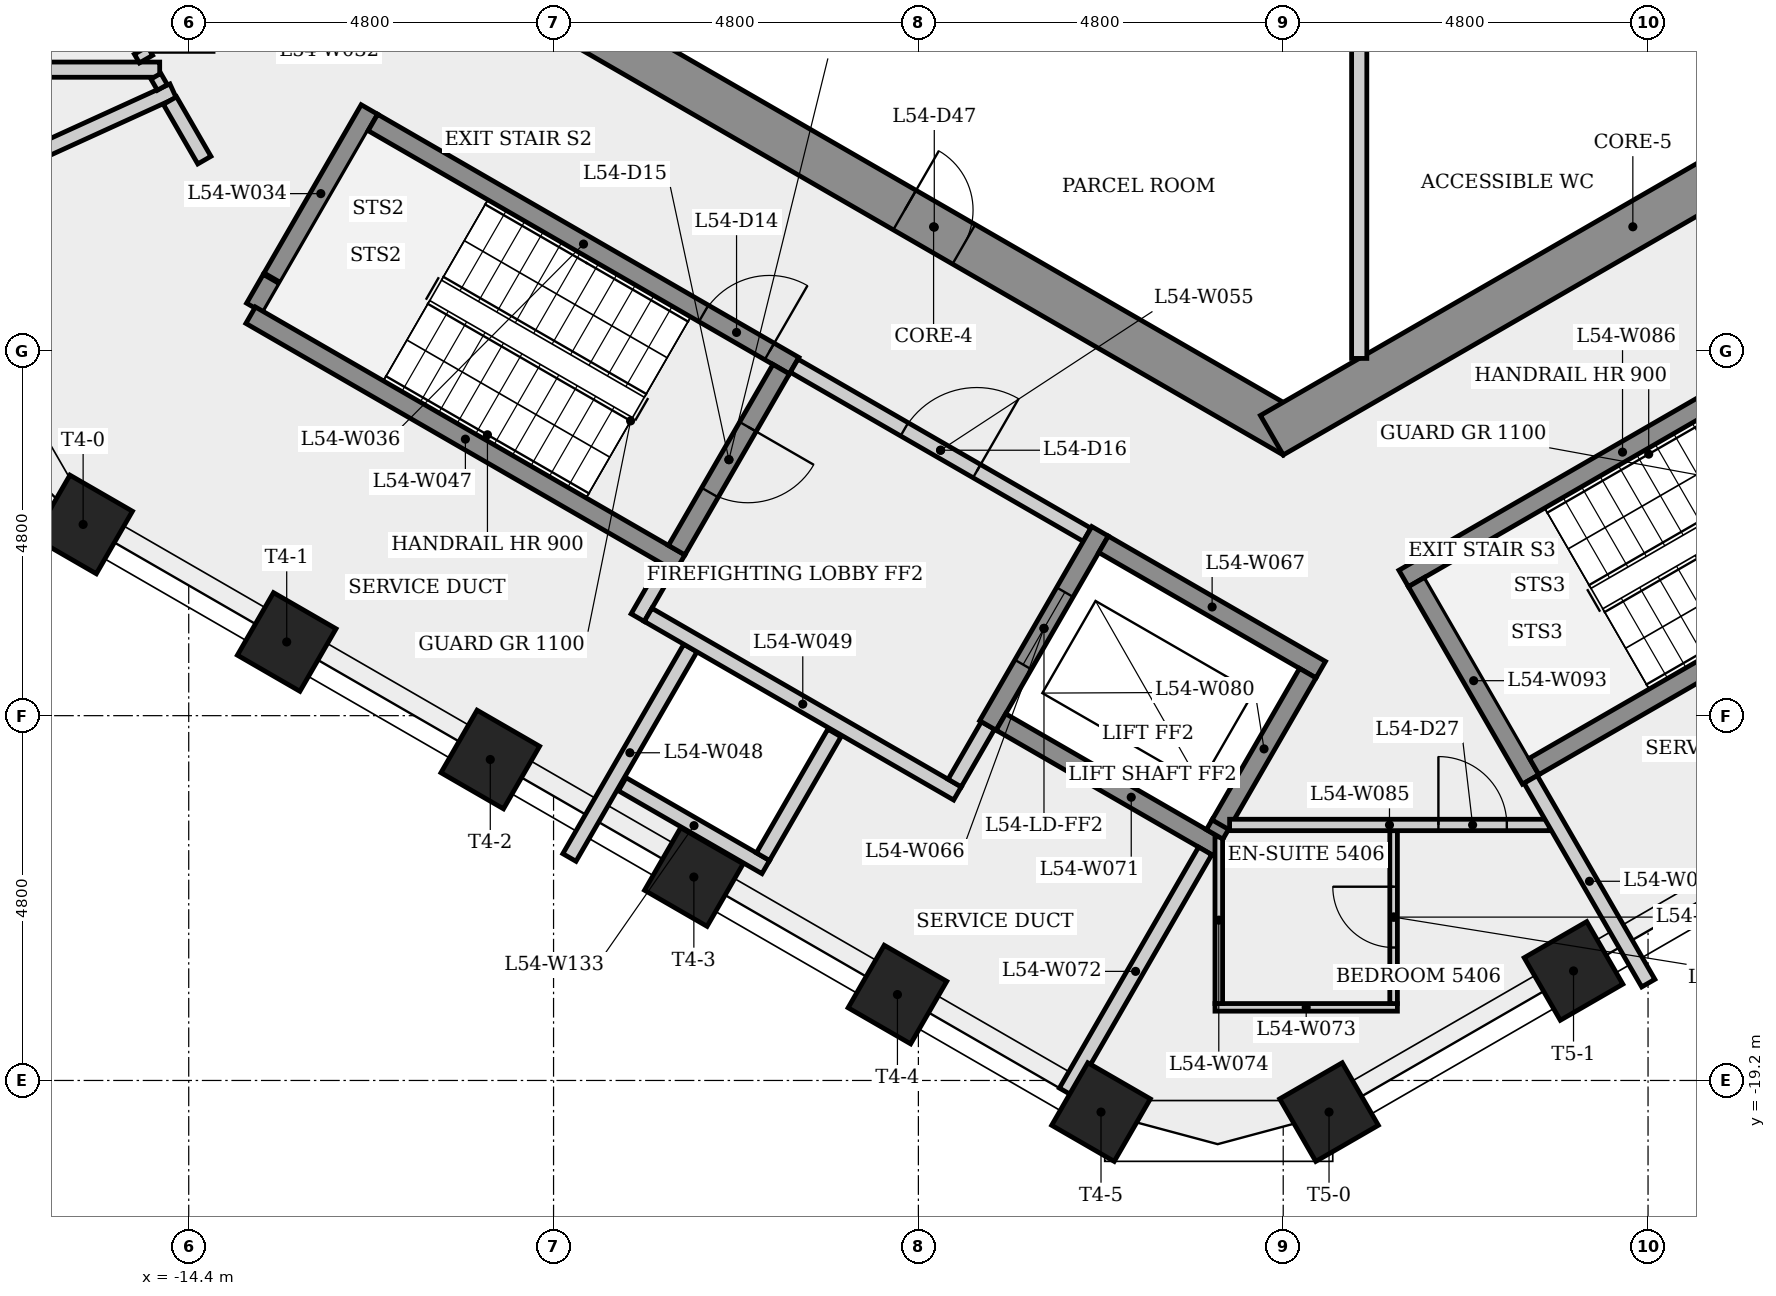
"""IFC4 building model, lengths in metres.
Left out: names, types, materials, properties, quantities, classifications, styles, units other than length and angle.
Written with IfcOpenShell. Run it as: python <this file> out.ifc"""

import sys

from ifc_helpers import new_model, si_unit, direction, frame, frame_2d, origin, origin_2d, place, context, subcontext, project, spatial, rectangle, extrude, element, fill, save


model = new_model("IFC4")
c1 = context("Model", 3, precision=1e-05, world=origin(), true_north=direction((0.0, 1.0)))
c2 = subcontext(c1, "Body", "Model", "MODEL_VIEW")
j1 = project(units=[si_unit("LENGTHUNIT", "METRE"), si_unit("PLANEANGLEUNIT", "RADIAN")], contexts=[c1])
p1 = place(None, origin())
s1 = spatial("IfcSite", under=j1, at=p1, CompositionType="ELEMENT")
p2 = place(p1, origin())
s2 = spatial("IfcBuilding", under=s1, at=p2, CompositionType="ELEMENT")
p3 = place(p2, frame((0.0, 0.0, 202.1)))
s3 = spatial("IfcBuildingStorey", under=s2, at=p3, CompositionType="ELEMENT", Elevation=202.1)
p4 = place(p3, frame((-9.35, -5.225, 0.0), z_axis=(0.0, 0.0, 1.0), x_axis=(0.866023993627, -0.500002442456, 0.0)))
e1 = element("IfcWall", 1, at=p4, inside=s3, PredefinedType="SHEAR", context=c2, shape_type="SweptSolid", body=[
    extrude(rectangle(XDim=10.97, YDim=0.6, at=frame_2d((5.485, 0.0))), origin(), (0.0, 0.0, 1.0), 4.0),
])
p5 = place(p4, frame((5.045, 0.0, 0.0)))
e2 = element("IfcOpeningElement", 2, at=p5, cuts=e1, PredefinedType="OPENING", context=c2, shape_type="SweptSolid", body=[
    extrude(rectangle(XDim=0.9, YDim=2.1, at=frame_2d((0.45, 1.05))), frame((0.0, 0.31, 0.0), z_axis=(0.0, -1.0, 0.0), x_axis=(1.0, 0.0, 0.0)), (0.0, 0.0, 1.0), 0.62),
])
p6 = place(p3, frame((-0.15, -10.71, 0.0), z_axis=(0.0, 0.0, 1.0), x_axis=(0.866023993627, 0.500002442456, 0.0)))
e3 = element("IfcWall", 3, at=p6, inside=s3, PredefinedType="SHEAR", context=c2, shape_type="SweptSolid", body=[
    extrude(rectangle(XDim=10.97, YDim=0.6, at=frame_2d((5.485, 0.0))), origin(), (0.0, 0.0, 1.0), 4.0),
])
p7 = place(p6, frame((7.281, 0.0, 0.0)))
e4 = element("IfcOpeningElement", 4, at=p7, cuts=e3, PredefinedType="OPENING", context=c2, shape_type="SweptSolid", body=[
    extrude(rectangle(XDim=0.9, YDim=2.1, at=frame_2d((0.45, 1.05))), frame((0.0, 0.31, 0.0), z_axis=(0.0, -1.0, 0.0), x_axis=(1.0, 0.0, 0.0)), (0.0, 0.0, 1.0), 0.62),
])
for number, where, z_axis, x_axis in (
    (5, (-15.789, -11.884, 0.0), (0.0, 0.0, 1.0), (-0.5, -0.866, 0.0)),
    (6, (-13.111, -13.43, 0.0), (0.0, 0.0, 1.0), (-0.5, -0.866, 0.0)),
    (7, (-10.432, -14.977, 0.0), (0.0, 0.0, 1.0), (-0.5, -0.866, 0.0)),
    (8, (-7.754, -16.523, 0.0), (0.0, 0.0, 1.0), (-0.5, -0.866, 0.0)),
    (9, (-5.076, -18.07, 0.0), (0.0, 0.0, 1.0), (-0.5, -0.866, 0.0)),
    (10, (-2.397, -19.616, 0.0), (0.0, 0.0, 1.0), (-0.5, -0.866, 0.0)),
    (11, (0.603, -19.616, 0.0), (0.0, 0.0, 1.0), (0.5, -0.866, 0.0)),
    (12, (3.82, -17.759, 0.0), (0.0, 0.0, 1.0), (0.5, -0.866, 0.0)),
):
    element("IfcColumn", number, at=place(p3, frame(where, z_axis=z_axis, x_axis=x_axis)), inside=s3, PredefinedType="COLUMN", context=c2, shape_type="SweptSolid", body=[
        extrude(rectangle(XDim=0.95, YDim=0.95, at=origin_2d()), origin(), (0.0, 0.0, 1.0), 4.0),
    ])
p8 = place(p3, frame((-29.883, -13.146, 0.0), z_axis=(0.0, 0.0, 1.0), x_axis=(0.909854392912, 0.414927684903, 0.0)))
e13 = element("IfcWall", 13, at=p8, inside=s3, PredefinedType="PLUMBINGWALL", context=c2, shape_type="SweptSolid", body=[
    extrude(rectangle(XDim=16.791, YDim=0.2, at=frame_2d((8.396, 0.0))), origin(), (0.0, 0.0, 1.0), 3.6),
])
p9 = place(p3, frame((-14.782, -5.9, 0.0), z_axis=(0.0, 0.0, 1.0), x_axis=(-1.0, 0.0, 0.0)))
e14 = element("IfcWall", 14, at=p9, inside=s3, PredefinedType="PLUMBINGWALL", context=c2, shape_type="SweptSolid", body=[
    extrude(rectangle(XDim=15.092, YDim=0.2, at=frame_2d((7.546, 0.0))), origin(), (0.0, 0.0, 1.0), 3.6),
])
p10 = place(p3, frame((-14.962, -5.761, 0.0), z_axis=(0.0, 0.0, 1.0), x_axis=(-0.499880961361, 0.866094119867, 0.0)))
e15 = element("IfcWall", 15, at=p10, inside=s3, PredefinedType="PLUMBINGWALL", context=c2, shape_type="SweptSolid", body=[
    extrude(rectangle(XDim=0.133, YDim=0.2, at=frame_2d((0.067, 0.0))), origin(), (0.0, 0.0, 1.0), 3.6),
])
p11 = place(p3, frame((-14.747, -6.134, 0.0), z_axis=(0.0, 0.0, 1.0), x_axis=(-0.499846793097, 0.866113839764, 0.0)))
e16 = element("IfcWall", 16, at=p11, inside=s3, PredefinedType="PARTITIONING", context=c2, shape_type="SweptSolid", body=[
    extrude(rectangle(XDim=0.17, YDim=0.15, at=frame_2d((0.085, 0.0))), origin(), (0.0, 0.0, 1.0), 3.6),
])
p12 = place(p3, frame((-14.195, -7.091, 0.0), z_axis=(0.0, 0.0, 1.0), x_axis=(-0.499940434119, 0.866059791431, 0.0)))
e17 = element("IfcWall", 17, at=p12, inside=s3, PredefinedType="PLUMBINGWALL", context=c2, shape_type="SweptSolid", body=[
    extrude(rectangle(XDim=0.905, YDim=0.2, at=frame_2d((0.452, 0.0))), origin(), (0.0, 0.0, 1.0), 3.6),
])
p13 = place(p3, frame((-13.531, -9.035, 0.0), z_axis=(0.0, 0.0, 1.0), x_axis=(0.500268326746, 0.86587042983, 0.0)))
e18 = element("IfcWall", 18, at=p13, inside=s3, PredefinedType="SHEAR", context=c2, shape_type="SweptSolid", body=[
    extrude(rectangle(XDim=0.439, YDim=0.25, at=frame_2d((0.219, 0.0))), origin(), (0.0, 0.0, 1.0), 3.6),
])
p14 = place(p3, frame((-13.301, -8.638, 0.0), z_axis=(0.0, 0.0, 1.0), x_axis=(0.499970471295, 0.866042451519, 0.0)))
e19 = element("IfcWall", 19, at=p14, inside=s3, PredefinedType="SHEAR", context=c2, shape_type="SweptSolid", body=[
    extrude(rectangle(XDim=2.556, YDim=0.25, at=frame_2d((1.278, 0.0))), origin(), (0.0, 0.0, 1.0), 3.6),
])
p15 = place(p3, frame((-11.977, -6.595, 0.0), z_axis=(0.0, 0.0, 1.0), x_axis=(0.866025499775, -0.499999833739, 0.0)))
e20 = element("IfcWall", 20, at=p15, inside=s3, PredefinedType="SHEAR", context=c2, shape_type="SweptSolid", body=[
    extrude(rectangle(XDim=6.4, YDim=0.25, at=frame_2d((3.2, 0.0))), origin(), (0.0, 0.0, 1.0), 3.6),
])
p16 = place(p15, frame((5.025, 0.0, 0.0)))
e21 = element("IfcOpeningElement", 21, at=p16, cuts=e20, PredefinedType="OPENING", context=c2, shape_type="SweptSolid", body=[
    extrude(rectangle(XDim=1.0, YDim=2.1, at=frame_2d((0.5, 1.05))), frame((0.0, 0.135, 0.0), z_axis=(0.0, -1.0, 0.0), x_axis=(1.0, 0.0, 0.0)), (0.0, 0.0, 1.0), 0.27),
])
p17 = place(p3, frame((-8.493, -13.11, 0.0), z_axis=(0.0, 0.0, 1.0), x_axis=(0.500067724834, 0.865986299303, 0.0)))
e22 = element("IfcWall", 22, at=p17, inside=s3, PredefinedType="PLUMBINGWALL", context=c2, shape_type="SweptSolid", body=[
    extrude(rectangle(XDim=0.775, YDim=0.2, at=frame_2d((0.388, 0.0))), origin(), (0.0, 0.0, 1.0), 3.6),
])
p18 = place(p3, frame((-7.935, -12.393, 0.0), z_axis=(0.0, 0.0, 1.0), x_axis=(-0.866031063448, 0.499990197047, 0.0)))
e23 = element("IfcWall", 23, at=p18, inside=s3, PredefinedType="SHEAR", context=c2, shape_type="SweptSolid", body=[
    extrude(rectangle(XDim=6.525, YDim=0.25, at=frame_2d((3.263, 0.0))), origin(), (0.0, 0.0, 1.0), 3.6),
])
p19 = place(p3, frame((-7.8, -13.51, 0.0), z_axis=(0.0, 0.0, 1.0), x_axis=(-0.500016846771, -0.866015677078, 0.0)))
e24 = element("IfcWall", 24, at=p19, inside=s3, PredefinedType="PLUMBINGWALL", context=c2, shape_type="SweptSolid", body=[
    extrude(rectangle(XDim=3.183, YDim=0.2, at=frame_2d((1.591, 0.0))), origin(), (0.0, 0.0, 1.0), 3.6),
])
p20 = place(p3, frame((-8.356, -13.073, 0.0), z_axis=(0.0, 0.0, 1.0), x_axis=(0.866038532462, -0.499977259774, 0.0)))
e25 = element("IfcWall", 25, at=p20, inside=s3, PredefinedType="PLUMBINGWALL", context=c2, shape_type="SweptSolid", body=[
    extrude(rectangle(XDim=4.7, YDim=0.2, at=frame_2d((2.35, 0.0))), origin(), (0.0, 0.0, 1.0), 3.6),
])
p21 = place(p3, frame((-6.605, -9.841, 0.0), z_axis=(0.0, 0.0, 1.0), x_axis=(-0.499996545922, -0.866027397988, 0.0)))
e26 = element("IfcWall", 26, at=p21, inside=s3, PredefinedType="SHEAR", context=c2, shape_type="SweptSolid", body=[
    extrude(rectangle(XDim=2.75, YDim=0.25, at=frame_2d((1.375, 0.0))), origin(), (0.0, 0.0, 1.0), 3.6),
])
p22 = place(p21, frame((0.875, 0.0, 0.0)))
e27 = element("IfcOpeningElement", 27, at=p22, cuts=e26, PredefinedType="OPENING", context=c2, shape_type="SweptSolid", body=[
    extrude(rectangle(XDim=1.0, YDim=2.1, at=frame_2d((0.5, 1.05))), frame((0.0, 0.135, 0.0), z_axis=(0.0, -1.0, 0.0), x_axis=(1.0, 0.0, 0.0)), (0.0, 0.0, 1.0), 0.27),
])
p23 = place(p3, frame((-6.435, -9.795, 0.0), z_axis=(0.0, 0.0, 1.0), x_axis=(0.866012907634, -0.500021643343, 0.0)))
e28 = element("IfcWall", 28, at=p23, inside=s3, PredefinedType="PARTITIONING", context=c2, shape_type="SweptSolid", body=[
    extrude(rectangle(XDim=4.45, YDim=0.2, at=frame_2d((2.225, 0.0))), origin(), (0.0, 0.0, 1.0), 3.6),
])
p24 = place(p23, frame((1.675, 0.0, 0.0)))
e29 = element("IfcOpeningElement", 29, at=p24, cuts=e28, PredefinedType="OPENING", context=c2, shape_type="SweptSolid", body=[
    extrude(rectangle(XDim=1.1, YDim=2.1, at=frame_2d((0.55, 1.05))), frame((0.0, 0.11, 0.0), z_axis=(0.0, -1.0, 0.0), x_axis=(1.0, 0.0, 0.0)), (0.0, 0.0, 1.0), 0.22),
])
p25 = place(p3, frame((-3.885, -14.529, 0.0), z_axis=(0.0, 0.0, 1.0), x_axis=(-0.499859285417, -0.866106630146, 0.0)))
e30 = element("IfcWall", 30, at=p25, inside=s3, PredefinedType="PLUMBINGWALL", context=c2, shape_type="SweptSolid", body=[
    extrude(rectangle(XDim=0.875, YDim=0.2, at=frame_2d((0.438, 0.0))), origin(), (0.0, 0.0, 1.0), 3.6),
])
p26 = place(p3, frame((-2.41, -11.974, 0.0), z_axis=(0.0, 0.0, 1.0), x_axis=(-0.500001826776, -0.866024349092, 0.0)))
e31 = element("IfcWall", 31, at=p26, inside=s3, PredefinedType="SHEAR", context=c2, shape_type="SweptSolid", body=[
    extrude(rectangle(XDim=2.95, YDim=0.25, at=frame_2d((1.475, 0.0))), origin(), (0.0, 0.0, 1.0), 3.6),
])
p27 = place(p26, frame((0.925, 0.0, 0.0)))
e32 = element("IfcOpeningElement", 32, at=p27, cuts=e31, PredefinedType="OPENING", context=c2, shape_type="SweptSolid", body=[
    extrude(rectangle(XDim=1.1, YDim=2.1, at=frame_2d((0.55, 1.05))), frame((0.0, 0.135, 0.0), z_axis=(0.0, -1.0, 0.0), x_axis=(1.0, 0.0, 0.0)), (0.0, 0.0, 1.0), 0.27),
])
p28 = place(p3, frame((-2.364, -12.145, 0.0), z_axis=(0.0, 0.0, 1.0), x_axis=(0.866040211805, -0.499974350878, 0.0)))
e33 = element("IfcWall", 33, at=p28, inside=s3, PredefinedType="SHEAR", context=c2, shape_type="SweptSolid", body=[
    extrude(rectangle(XDim=3.3, YDim=0.25, at=frame_2d((1.65, 0.0))), origin(), (0.0, 0.0, 1.0), 3.6),
])
p29 = place(p3, frame((-0.856, -16.133, 0.0), z_axis=(0.0, 0.0, 1.0), x_axis=(-0.866021716278, 0.500006386895, 0.0)))
e34 = element("IfcWall", 34, at=p29, inside=s3, PredefinedType="SHEAR", context=c2, shape_type="SweptSolid", body=[
    extrude(rectangle(XDim=3.3, YDim=0.25, at=frame_2d((1.65, 0.0))), origin(), (0.0, 0.0, 1.0), 3.6),
])
p30 = place(p3, frame((-1.027, -16.179, 0.0), z_axis=(0.0, 0.0, 1.0), x_axis=(-0.499989866495, -0.866031254287, 0.0)))
e35 = element("IfcWall", 35, at=p30, inside=s3, PredefinedType="PLUMBINGWALL", context=c2, shape_type="SweptSolid", body=[
    extrude(rectangle(XDim=3.662, YDim=0.2, at=frame_2d((1.831, 0.0))), origin(), (0.0, 0.0, 1.0), 3.6),
])
p31 = place(p3, frame((-0.898, -18.238, 0.0), z_axis=(0.0, 0.0, 1.0), x_axis=(1.0, 0.0, 0.0)))
e36 = element("IfcWall", 36, at=p31, inside=s3, PredefinedType="PARTITIONING", context=c2, shape_type="SweptSolid", body=[
    extrude(rectangle(XDim=2.4, YDim=0.1, at=frame_2d((1.2, 0.0))), origin(), (0.0, 0.0, 1.0), 3.6),
])
p32 = place(p3, frame((-0.848, -15.993, 0.0), z_axis=(0.0, 0.0, 1.0), x_axis=(0.0, -1.0, 0.0)))
e37 = element("IfcWall", 37, at=p32, inside=s3, PredefinedType="PARTITIONING", context=c2, shape_type="SweptSolid", body=[
    extrude(rectangle(XDim=2.195, YDim=0.1, at=frame_2d((1.097, 0.0))), origin(), (0.0, 0.0, 1.0), 3.6),
])
p33 = place(p3, frame((-0.823, -15.825, 0.0), z_axis=(0.0, 0.0, 1.0), x_axis=(-0.500431039639, -0.865776399866, 0.0)))
e38 = element("IfcWall", 38, at=p33, inside=s3, PredefinedType="SHEAR", context=c2, shape_type="SweptSolid", body=[
    extrude(rectangle(XDim=0.159, YDim=0.25, at=frame_2d((0.08, 0.0))), origin(), (0.0, 0.0, 1.0), 4.0),
])
p34 = place(p3, frame((0.323, -13.841, 0.0), z_axis=(0.0, 0.0, 1.0), x_axis=(-0.500086702647, -0.865975340201, 0.0)))
e39 = element("IfcWall", 39, at=p34, inside=s3, PredefinedType="SHEAR", context=c2, shape_type="SweptSolid", body=[
    extrude(rectangle(XDim=2.301, YDim=0.25, at=frame_2d((1.151, 0.0))), origin(), (0.0, 0.0, 1.0), 4.0),
])
p35 = place(p3, frame((1.0, -5.25, 0.0), z_axis=(0.0, 0.0, 1.0), x_axis=(0.0, -1.0, 0.0)))
e40 = element("IfcWall", 40, at=p35, inside=s3, PredefinedType="PARTITIONING", context=c2, shape_type="SweptSolid", body=[
    extrude(rectangle(XDim=4.449, YDim=0.2, at=frame_2d((2.225, 0.0))), origin(), (0.0, 0.0, 1.0), 3.6),
])
p36 = place(p3, frame((1.452, -18.188, 0.0), z_axis=(0.0, 0.0, 1.0), x_axis=(0.0, 1.0, 0.0)))
e41 = element("IfcWall", 41, at=p36, inside=s3, PredefinedType="PARTITIONING", context=c2, shape_type="SweptSolid", body=[
    extrude(rectangle(XDim=2.275, YDim=0.1, at=frame_2d((1.137, 0.0))), origin(), (0.0, 0.0, 1.0), 3.6),
])
p37 = place(p36, frame((0.738, 0.0, 0.0)))
e42 = element("IfcOpeningElement", 42, at=p37, cuts=e41, PredefinedType="OPENING", context=c2, shape_type="SweptSolid", body=[
    extrude(rectangle(XDim=0.8, YDim=2.1, at=frame_2d((0.4, 1.05))), frame((0.0, 0.06, 0.0), z_axis=(0.0, -1.0, 0.0), x_axis=(1.0, 0.0, 0.0)), (0.0, 0.0, 1.0), 0.12),
])
p38 = place(p3, frame((-0.705, -15.838, 0.0), z_axis=(0.0, 0.0, 1.0), x_axis=(1.0, 0.0, 0.0)))
e43 = element("IfcWall", 43, at=p38, inside=s3, PredefinedType="PARTITIONING", context=c2, shape_type="SweptSolid", body=[
    extrude(rectangle(XDim=4.207, YDim=0.15, at=frame_2d((2.104, 0.0))), origin(), (0.0, 0.0, 1.0), 3.6),
])
p39 = place(p38, frame((2.747, 0.0, 0.0)))
e44 = element("IfcOpeningElement", 44, at=p39, cuts=e43, PredefinedType="OPENING", context=c2, shape_type="SweptSolid", body=[
    extrude(rectangle(XDim=0.9, YDim=2.1, at=frame_2d((0.45, 1.05))), frame((0.0, 0.085, 0.0), z_axis=(0.0, -1.0, 0.0), x_axis=(1.0, 0.0, 0.0)), (0.0, 0.0, 1.0), 0.17),
])
p40 = place(p3, frame((1.585, -12.595, 0.0), z_axis=(0.0, 0.0, 1.0), x_axis=(0.866036417653, 0.499980922934, 0.0)))
e45 = element("IfcWall", 45, at=p40, inside=s3, PredefinedType="SHEAR", context=c2, shape_type="SweptSolid", body=[
    extrude(rectangle(XDim=6.65, YDim=0.25, at=frame_2d((3.325, 0.0))), origin(), (0.0, 0.0, 1.0), 3.6),
])
p41 = place(p40, frame((5.275, 0.0, 0.0)))
e46 = element("IfcOpeningElement", 46, at=p41, cuts=e45, PredefinedType="OPENING", context=c2, shape_type="SweptSolid", body=[
    extrude(rectangle(XDim=1.0, YDim=2.1, at=frame_2d((0.5, 1.05))), frame((0.0, 0.135, 0.0), z_axis=(0.0, -1.0, 0.0), x_axis=(1.0, 0.0, 0.0)), (0.0, 0.0, 1.0), 0.27),
])
p42 = place(p3, frame((3.256, -15.239, 0.0), z_axis=(0.0, 0.0, 1.0), x_axis=(-0.50002537861, 0.866010750942, 0.0)))
e47 = element("IfcWall", 47, at=p42, inside=s3, PredefinedType="SHEAR", context=c2, shape_type="SweptSolid", body=[
    extrude(rectangle(XDim=3.0, YDim=0.25, at=frame_2d((1.5, 0.0))), origin(), (0.0, 0.0, 1.0), 3.6),
])
p43 = place(p3, frame((3.256, -15.239, 0.0), z_axis=(0.0, 0.0, 1.0), x_axis=(0.499981900942, -0.866035853028, 0.0)))
e48 = element("IfcWall", 48, at=p43, inside=s3, PredefinedType="PLUMBINGWALL", context=c2, shape_type="SweptSolid", body=[
    extrude(rectangle(XDim=3.095, YDim=0.2, at=frame_2d((1.548, 0.0))), origin(), (0.0, 0.0, 1.0), 3.6),
])
p44 = place(p3, frame((3.301, -15.068, 0.0), z_axis=(0.0, 0.0, 1.0), x_axis=(0.866035036182, 0.499983315828, 0.0)))
e49 = element("IfcWall", 49, at=p44, inside=s3, PredefinedType="SHEAR", context=c2, shape_type="SweptSolid", body=[
    extrude(rectangle(XDim=6.4, YDim=0.25, at=frame_2d((3.2, 0.0))), origin(), (0.0, 0.0, 1.0), 4.0),
])
p45 = place(p3, frame((-6.808, -16.392, 0.0), z_axis=(0.0, 0.0, 1.0), x_axis=(-0.866008413041, 0.500029427677, 0.0)))
e50 = element("IfcWall", 50, at=p45, inside=s3, PredefinedType="PLUMBINGWALL", context=c2, shape_type="SweptSolid", body=[
    extrude(rectangle(XDim=2.18, YDim=0.2, at=frame_2d((1.09, 0.0))), origin(), (0.0, 0.0, 1.0), 3.6),
])
p46 = place(p3, frame((-5.905, -14.627, 0.0), z_axis=(0.0, 0.0, 1.0), x_axis=(-0.499966013754, -0.866045024864, 0.0)))
e51 = element("IfcWall", 51, at=p46, inside=s3, PredefinedType="PLUMBINGWALL", context=c2, shape_type="SweptSolid", body=[
    extrude(rectangle(XDim=1.88, YDim=0.2, at=frame_2d((0.94, 0.0))), origin(), (0.0, 0.0, 1.0), 3.6),
])
p47 = place(p16, origin())
e52 = element("IfcDoor", 52, at=p47, inside=s3, OperationType="SINGLE_SWING_RIGHT", PredefinedType="DOOR", context=c2, shape_type="SweptSolid", body=[
    extrude(rectangle(XDim=1.0, YDim=2.1, at=frame_2d((0.5, 1.05))), frame((0.0, 0.025, 0.0), z_axis=(0.0, -1.0, 0.0), x_axis=(1.0, 0.0, 0.0)), (0.0, 0.0, 1.0), 0.05),
])
fill(e21, e52)
p48 = place(p22, origin())
e53 = element("IfcDoor", 53, at=p48, inside=s3, OperationType="SINGLE_SWING_LEFT", PredefinedType="DOOR", context=c2, shape_type="SweptSolid", body=[
    extrude(rectangle(XDim=1.0, YDim=2.1, at=frame_2d((0.5, 1.05))), frame((0.0, 0.025, 0.0), z_axis=(0.0, -1.0, 0.0), x_axis=(1.0, 0.0, 0.0)), (0.0, 0.0, 1.0), 0.05),
])
fill(e27, e53)
p49 = place(p24, origin())
e54 = element("IfcDoor", 54, at=p49, inside=s3, OperationType="SINGLE_SWING_RIGHT", PredefinedType="DOOR", context=c2, shape_type="SweptSolid", body=[
    extrude(rectangle(XDim=1.1, YDim=2.1, at=frame_2d((0.55, 1.05))), frame((0.0, 0.025, 0.0), z_axis=(0.0, -1.0, 0.0), x_axis=(1.0, 0.0, 0.0)), (0.0, 0.0, 1.0), 0.05),
])
fill(e29, e54)
p50 = place(p27, origin())
e55 = element("IfcDoor", 55, at=p50, inside=s3, OperationType="SLIDING_TO_LEFT", PredefinedType="DOOR", context=c2, shape_type="SweptSolid", body=[
    extrude(rectangle(XDim=1.1, YDim=2.1, at=frame_2d((0.55, 1.05))), frame((0.0, 0.025, 0.0), z_axis=(0.0, -1.0, 0.0), x_axis=(1.0, 0.0, 0.0)), (0.0, 0.0, 1.0), 0.05),
])
fill(e32, e55)
p51 = place(p39, origin())
e56 = element("IfcDoor", 56, at=p51, inside=s3, OperationType="SINGLE_SWING_LEFT", PredefinedType="DOOR", context=c2, shape_type="SweptSolid", body=[
    extrude(rectangle(XDim=0.9, YDim=2.1, at=frame_2d((0.45, 1.05))), frame((0.0, 0.025, 0.0), z_axis=(0.0, -1.0, 0.0), x_axis=(1.0, 0.0, 0.0)), (0.0, 0.0, 1.0), 0.05),
])
fill(e44, e56)
p52 = place(p37, origin())
e57 = element("IfcDoor", 57, at=p52, inside=s3, OperationType="SINGLE_SWING_RIGHT", PredefinedType="DOOR", context=c2, shape_type="SweptSolid", body=[
    extrude(rectangle(XDim=0.8, YDim=2.1, at=frame_2d((0.4, 1.05))), frame((0.0, 0.025, 0.0), z_axis=(0.0, -1.0, 0.0), x_axis=(1.0, 0.0, 0.0)), (0.0, 0.0, 1.0), 0.05),
])
fill(e42, e57)
p53 = place(p5, origin())
e58 = element("IfcDoor", 58, at=p53, inside=s3, OperationType="SINGLE_SWING_LEFT", PredefinedType="DOOR", context=c2, shape_type="SweptSolid", body=[
    extrude(rectangle(XDim=0.9, YDim=2.1, at=frame_2d((0.45, 1.05))), frame((0.0, 0.025, 0.0), z_axis=(0.0, -1.0, 0.0), x_axis=(1.0, 0.0, 0.0)), (0.0, 0.0, 1.0), 0.05),
])
fill(e2, e58)
save(model, sys.argv[1])
